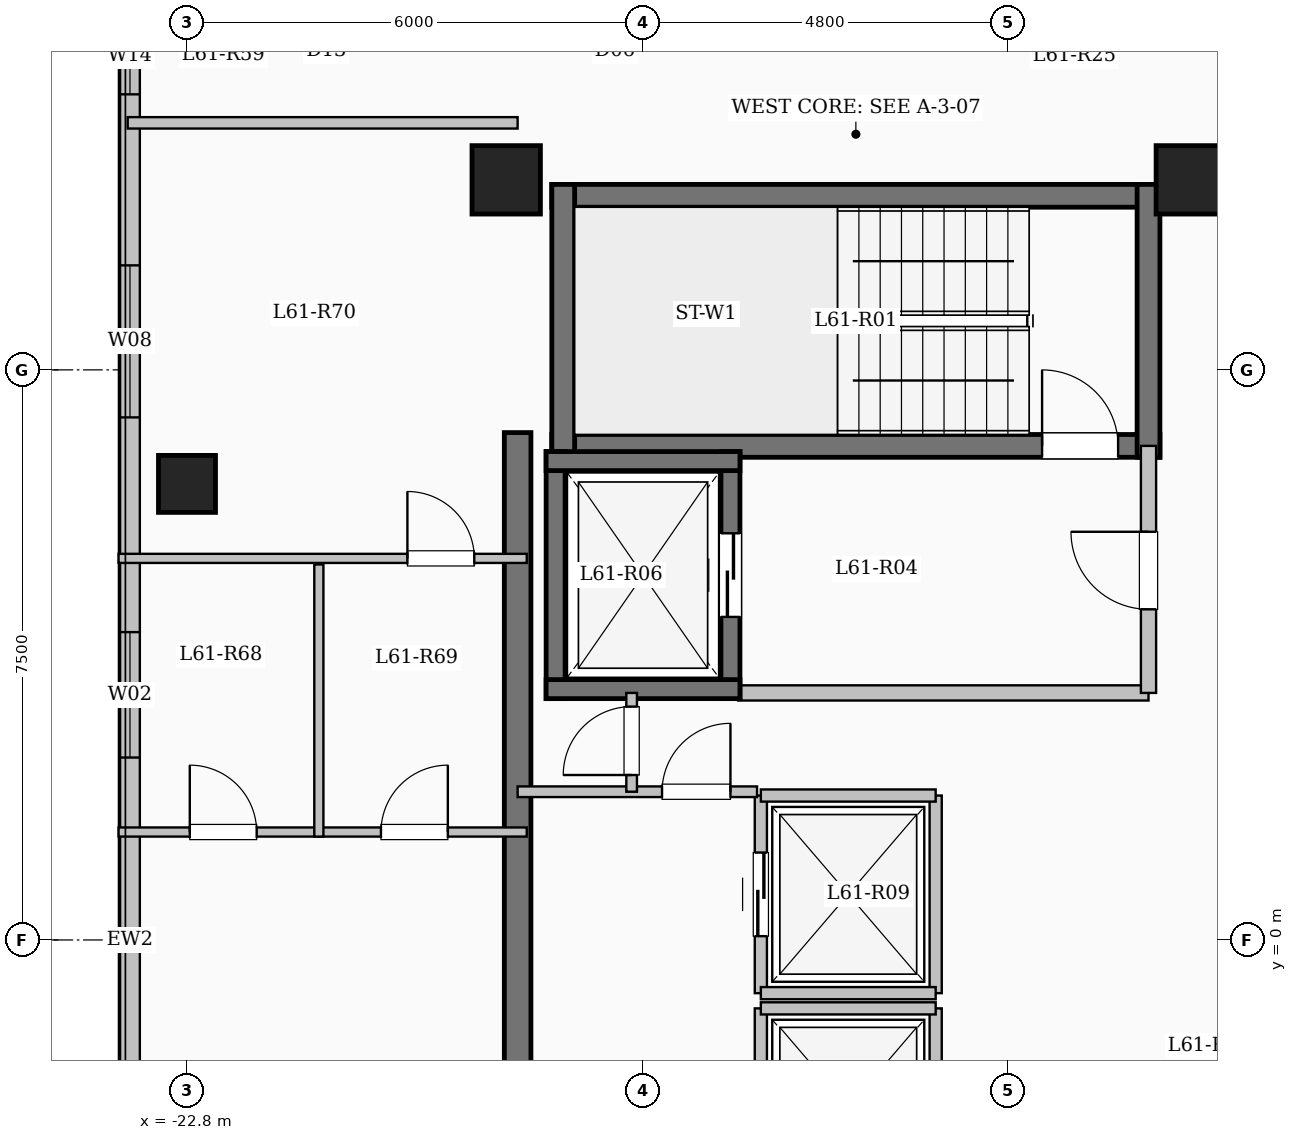
"""IFC4 building model, lengths in metres.
Left out: names, types, materials, properties, quantities, classifications, styles, units other than length and angle.
Written with IfcOpenShell. Run it as: python <this file> out.ifc"""

import sys

from ifc_helpers import new_model, si_unit, direction, frame, frame_2d, origin, origin_2d, place, context, subcontext, project, spatial, rectangle, extrude, element, fill, save


model = new_model("IFC4")
c1 = context("Model", 3, precision=1e-05, world=origin(), true_north=direction((0.0, 1.0)))
c2 = subcontext(c1, "Body", "Model", "MODEL_VIEW")
j1 = project(units=[si_unit("LENGTHUNIT", "METRE"), si_unit("PLANEANGLEUNIT", "RADIAN")], contexts=[c1])
p1 = place(None, origin())
s1 = spatial("IfcSite", under=j1, at=p1, CompositionType="ELEMENT")
p2 = place(p1, origin())
s2 = spatial("IfcBuilding", under=s1, at=p2, CompositionType="ELEMENT")
p3 = place(p2, frame((0.0, 0.0, 223.75)))
s3 = spatial("IfcBuildingStorey", under=s2, at=p3, CompositionType="ELEMENT", Elevation=223.75)
for number, where, z_axis, x_axis in (
    (1, (-9.6, 10.0, 0.0), (0.0, 0.0, 1.0), (1.0, 0.0, 0.0)),
    (2, (-18.6, 10.0, 0.0), (0.0, 0.0, 1.0), (1.0, 0.0, 0.0)),
):
    element("IfcColumn", number, at=place(p3, frame(where, z_axis=z_axis, x_axis=x_axis)), inside=s3, PredefinedType="COLUMN", context=c2, shape_type="SweptSolid", body=[
        extrude(rectangle(XDim=0.9, YDim=0.9, at=origin_2d()), origin(), (0.0, 0.0, 1.0), 3.35),
    ])
p4 = place(p3, frame((-22.8, 6.0, 0.0), z_axis=(0.0, 0.0, 1.0), x_axis=(1.0, 0.0, 0.0)))
e3 = element("IfcColumn", 3, at=p4, inside=s3, PredefinedType="COLUMN", context=c2, shape_type="SweptSolid", body=[
    extrude(rectangle(XDim=0.75, YDim=0.75, at=origin_2d()), origin(), (0.0, 0.0, 1.0), 3.35),
])
p5 = place(p3, frame((-23.55, -17.25, 0.0), z_axis=(0.0, 0.0, 1.0), x_axis=(0.0, 1.0, 0.0)))
e4 = element("IfcWall", 4, at=p5, inside=s3, PredefinedType="SOLIDWALL", context=c2, shape_type="SweptSolid", body=[
    extrude(rectangle(XDim=34.5, YDim=0.26, at=frame_2d((17.25, 0.0))), origin(), (0.0, 0.0, 1.0), 3.05),
])
p6 = place(p5, frame((2.825, 0.0, 0.9)))
e5 = element("IfcOpeningElement", 5, at=p6, cuts=e4, PredefinedType="OPENING", context=c2, shape_type="SweptSolid", body=[
    extrude(rectangle(XDim=2.2, YDim=1.75, at=frame_2d((1.1, 0.875))), frame((0.0, 0.14, 0.0), z_axis=(0.0, -1.0, 0.0), x_axis=(1.0, 0.0, 0.0)), (0.0, 0.0, 1.0), 0.28),
])
p7 = place(p5, frame((8.325, 0.0, 0.95)))
e6 = element("IfcOpeningElement", 6, at=p7, cuts=e4, PredefinedType="OPENING", context=c2, shape_type="SweptSolid", body=[
    extrude(rectangle(XDim=1.2, YDim=1.5, at=frame_2d((0.6, 0.75))), frame((0.0, 0.14, 0.0), z_axis=(0.0, -1.0, 0.0), x_axis=(1.0, 0.0, 0.0)), (0.0, 0.0, 1.0), 0.28),
])
p8 = place(p5, frame((13.25, 0.0, 0.9)))
e7 = element("IfcOpeningElement", 7, at=p8, cuts=e4, PredefinedType="OPENING", context=c2, shape_type="SweptSolid", body=[
    extrude(rectangle(XDim=2.2, YDim=1.75, at=frame_2d((1.1, 0.875))), frame((0.0, 0.14, 0.0), z_axis=(0.0, -1.0, 0.0), x_axis=(1.0, 0.0, 0.0)), (0.0, 0.0, 1.0), 0.28),
])
p9 = place(p5, frame((19.65, 0.0, 0.9)))
e8 = element("IfcOpeningElement", 8, at=p9, cuts=e4, PredefinedType="OPENING", context=c2, shape_type="SweptSolid", body=[
    extrude(rectangle(XDim=1.65, YDim=1.6, at=frame_2d((0.825, 0.8))), frame((0.0, 0.14, 0.0), z_axis=(0.0, -1.0, 0.0), x_axis=(1.0, 0.0, 0.0)), (0.0, 0.0, 1.0), 0.28),
])
p10 = place(p5, frame((24.125, 0.0, 0.9)))
e9 = element("IfcOpeningElement", 9, at=p10, cuts=e4, PredefinedType="OPENING", context=c2, shape_type="SweptSolid", body=[
    extrude(rectangle(XDim=2.0, YDim=1.7, at=frame_2d((1.0, 0.85))), frame((0.0, 0.14, 0.0), z_axis=(0.0, -1.0, 0.0), x_axis=(1.0, 0.0, 0.0)), (0.0, 0.0, 1.0), 0.28),
])
p11 = place(p5, frame((28.375, 0.0, 0.95)))
e10 = element("IfcOpeningElement", 10, at=p11, cuts=e4, PredefinedType="OPENING", context=c2, shape_type="SweptSolid", body=[
    extrude(rectangle(XDim=1.0, YDim=1.5, at=frame_2d((0.5, 0.75))), frame((0.0, 0.14, 0.0), z_axis=(0.0, -1.0, 0.0), x_axis=(1.0, 0.0, 0.0)), (0.0, 0.0, 1.0), 0.28),
])
p12 = place(p5, frame((31.125, 0.0, 0.9)))
e11 = element("IfcOpeningElement", 11, at=p12, cuts=e4, PredefinedType="OPENING", context=c2, shape_type="SweptSolid", body=[
    extrude(rectangle(XDim=2.0, YDim=1.7, at=frame_2d((1.0, 0.85))), frame((0.0, 0.14, 0.0), z_axis=(0.0, -1.0, 0.0), x_axis=(1.0, 0.0, 0.0)), (0.0, 0.0, 1.0), 0.28),
])
p13 = place(p3, frame((-18.0, 9.79, 0.0), z_axis=(0.0, 0.0, 1.0), x_axis=(1.0, 0.0, 0.0)))
e12 = element("IfcWall", 12, at=p13, inside=s3, PredefinedType="SHEAR", context=c2, shape_type="SweptSolid", body=[
    extrude(rectangle(XDim=8.0, YDim=0.3, at=frame_2d((4.0, 0.0))), origin(), (0.0, 0.0, 1.0), 3.35),
])
p14 = place(p3, frame((-18.0, 6.5, 0.0), z_axis=(0.0, 0.0, 1.0), x_axis=(1.0, 0.0, 0.0)))
e13 = element("IfcWall", 13, at=p14, inside=s3, PredefinedType="SHEAR", context=c2, shape_type="SweptSolid", body=[
    extrude(rectangle(XDim=8.0, YDim=0.3, at=frame_2d((4.0, 0.0))), origin(), (0.0, 0.0, 1.0), 3.35),
])
p15 = place(p14, frame((6.45, 0.0, 0.0)))
e14 = element("IfcOpeningElement", 14, at=p15, cuts=e13, PredefinedType="OPENING", context=c2, shape_type="SweptSolid", body=[
    extrude(rectangle(XDim=1.0, YDim=2.15, at=frame_2d((0.5, 1.075))), frame((0.0, 0.16, 0.0), z_axis=(0.0, -1.0, 0.0), x_axis=(1.0, 0.0, 0.0)), (0.0, 0.0, 1.0), 0.32),
])
for number, where, z_axis, x_axis in (
    (15, (-17.85, 6.35, 0.0), (0.0, 0.0, 1.0), (0.0, 1.0, 0.0)),
    (16, (-10.15, 6.35, 0.0), (0.0, 0.0, 1.0), (0.0, 1.0, 0.0)),
):
    element("IfcWall", number, at=place(p3, frame(where, z_axis=z_axis, x_axis=x_axis)), inside=s3, PredefinedType="SHEAR", context=c2, shape_type="SweptSolid", body=[
        extrude(rectangle(XDim=3.59, YDim=0.3, at=frame_2d((1.795, 0.0))), origin(), (0.0, 0.0, 1.0), 3.35),
    ])
p16 = place(p3, frame((-15.55, 3.25, 0.0), z_axis=(0.0, 0.0, 1.0), x_axis=(1.0, 0.0, 0.0)))
e17 = element("IfcWall", 17, at=p16, inside=s3, PredefinedType="SOLIDWALL", context=c2, shape_type="SweptSolid", body=[
    extrude(rectangle(XDim=5.4, YDim=0.2, at=frame_2d((2.7, 0.0))), origin(), (0.0, 0.0, 1.0), 3.05),
])
p17 = place(p3, frame((-10.15, 3.25, 0.0), z_axis=(0.0, 0.0, 1.0), x_axis=(0.0, 1.0, 0.0)))
e18 = element("IfcWall", 18, at=p17, inside=s3, PredefinedType="SOLIDWALL", context=c2, shape_type="SweptSolid", body=[
    extrude(rectangle(XDim=3.25, YDim=0.2, at=frame_2d((1.625, 0.0))), origin(), (0.0, 0.0, 1.0), 3.05),
])
p18 = place(p17, frame((1.1, 0.0, 0.0)))
e19 = element("IfcOpeningElement", 19, at=p18, cuts=e18, PredefinedType="OPENING", context=c2, shape_type="SweptSolid", body=[
    extrude(rectangle(XDim=1.02, YDim=2.15, at=frame_2d((0.51, 1.075))), frame((0.0, 0.11, 0.0), z_axis=(0.0, -1.0, 0.0), x_axis=(1.0, 0.0, 0.0)), (0.0, 0.0, 1.0), 0.22),
])
p19 = place(p3, frame((-17.95, 3.175, 0.0), z_axis=(0.0, 0.0, 1.0), x_axis=(0.0, 1.0, 0.0)))
e20 = element("IfcWall", 20, at=p19, inside=s3, PredefinedType="SHEAR", context=c2, shape_type="SweptSolid", body=[
    extrude(rectangle(XDim=3.25, YDim=0.25, at=frame_2d((1.625, 0.0))), origin(), (0.0, 0.0, 1.0), 3.35),
])
p20 = place(p3, frame((-15.65, 3.175, 0.0), z_axis=(0.0, 0.0, 1.0), x_axis=(0.0, 1.0, 0.0)))
e21 = element("IfcWall", 21, at=p20, inside=s3, PredefinedType="SHEAR", context=c2, shape_type="SweptSolid", body=[
    extrude(rectangle(XDim=3.25, YDim=0.25, at=frame_2d((1.625, 0.0))), origin(), (0.0, 0.0, 1.0), 3.35),
])
p21 = place(p20, frame((1.075, 0.0, 0.0)))
e22 = element("IfcOpeningElement", 22, at=p21, cuts=e21, PredefinedType="OPENING", context=c2, shape_type="SweptSolid", body=[
    extrude(rectangle(XDim=1.1, YDim=2.15, at=frame_2d((0.55, 1.075))), frame((0.0, 0.135, 0.0), z_axis=(0.0, -1.0, 0.0), x_axis=(1.0, 0.0, 0.0)), (0.0, 0.0, 1.0), 0.27),
])
for number, where, z_axis, x_axis in (
    (23, (-18.075, 3.3, 0.0), (0.0, 0.0, 1.0), (1.0, 0.0, 0.0)),
    (24, (-18.075, 6.3, 0.0), (0.0, 0.0, 1.0), (1.0, 0.0, 0.0)),
):
    element("IfcWall", number, at=place(p3, frame(where, z_axis=z_axis, x_axis=x_axis)), inside=s3, PredefinedType="SHEAR", context=c2, shape_type="SweptSolid", body=[
        extrude(rectangle(XDim=2.55, YDim=0.25, at=frame_2d((1.275, 0.0))), origin(), (0.0, 0.0, 1.0), 3.35),
    ])
p22 = place(p3, frame((-15.25, -3.5, 0.0), z_axis=(0.0, 0.0, 1.0), x_axis=(0.0, 1.0, 0.0)))
e25 = element("IfcWall", 25, at=p22, inside=s3, PredefinedType="SOLIDWALL", context=c2, shape_type="SweptSolid", body=[
    extrude(rectangle(XDim=2.6, YDim=0.16, at=frame_2d((1.3, 0.0))), origin(), (0.0, 0.0, 1.0), 3.05),
])
p23 = place(p22, frame((0.75, 0.0, 0.0)))
e26 = element("IfcOpeningElement", 26, at=p23, cuts=e25, PredefinedType="OPENING", context=c2, shape_type="SweptSolid", body=[
    extrude(rectangle(XDim=1.1, YDim=2.15, at=frame_2d((0.55, 1.075))), frame((0.0, 0.09, 0.0), z_axis=(0.0, -1.0, 0.0), x_axis=(1.0, 0.0, 0.0)), (0.0, 0.0, 1.0), 0.18),
])
p24 = place(p3, frame((-12.95, -3.5, 0.0), z_axis=(0.0, 0.0, 1.0), x_axis=(0.0, 1.0, 0.0)))
e27 = element("IfcWall", 27, at=p24, inside=s3, PredefinedType="SOLIDWALL", context=c2, shape_type="SweptSolid", body=[
    extrude(rectangle(XDim=2.6, YDim=0.16, at=frame_2d((1.3, 0.0))), origin(), (0.0, 0.0, 1.0), 3.05),
])
p25 = place(p3, frame((-15.25, -0.9, 0.0), z_axis=(0.0, 0.0, 1.0), x_axis=(1.0, 0.0, 0.0)))
e28 = element("IfcWall", 28, at=p25, inside=s3, PredefinedType="SOLIDWALL", context=c2, shape_type="SweptSolid", body=[
    extrude(rectangle(XDim=2.3, YDim=0.16, at=frame_2d((1.15, 0.0))), origin(), (0.0, 0.0, 1.0), 3.05),
])
p26 = place(p3, frame((-15.25, -0.7, 0.0), z_axis=(0.0, 0.0, 1.0), x_axis=(0.0, 1.0, 0.0)))
e29 = element("IfcWall", 29, at=p26, inside=s3, PredefinedType="SOLIDWALL", context=c2, shape_type="SweptSolid", body=[
    extrude(rectangle(XDim=2.6, YDim=0.16, at=frame_2d((1.3, 0.0))), origin(), (0.0, 0.0, 1.0), 3.05),
])
p27 = place(p26, frame((0.75, 0.0, 0.0)))
e30 = element("IfcOpeningElement", 30, at=p27, cuts=e29, PredefinedType="OPENING", context=c2, shape_type="SweptSolid", body=[
    extrude(rectangle(XDim=1.1, YDim=2.15, at=frame_2d((0.55, 1.075))), frame((0.0, 0.09, 0.0), z_axis=(0.0, -1.0, 0.0), x_axis=(1.0, 0.0, 0.0)), (0.0, 0.0, 1.0), 0.18),
])
p28 = place(p3, frame((-12.95, -0.7, 0.0), z_axis=(0.0, 0.0, 1.0), x_axis=(0.0, 1.0, 0.0)))
e31 = element("IfcWall", 31, at=p28, inside=s3, PredefinedType="SOLIDWALL", context=c2, shape_type="SweptSolid", body=[
    extrude(rectangle(XDim=2.6, YDim=0.16, at=frame_2d((1.3, 0.0))), origin(), (0.0, 0.0, 1.0), 3.05),
])
for number, where, z_axis, x_axis in (
    (32, (-15.25, -0.7, 0.0), (0.0, 0.0, 1.0), (1.0, 0.0, 0.0)),
    (33, (-15.25, 1.9, 0.0), (0.0, 0.0, 1.0), (1.0, 0.0, 0.0)),
):
    element("IfcWall", number, at=place(p3, frame(where, z_axis=z_axis, x_axis=x_axis)), inside=s3, PredefinedType="SOLIDWALL", context=c2, shape_type="SweptSolid", body=[
        extrude(rectangle(XDim=2.3, YDim=0.16, at=frame_2d((1.15, 0.0))), origin(), (0.0, 0.0, 1.0), 3.05),
    ])
p29 = place(p3, frame((-18.45, -7.375, 0.0), z_axis=(0.0, 0.0, 1.0), x_axis=(0.0, 1.0, 0.0)))
e34 = element("IfcWall", 34, at=p29, inside=s3, PredefinedType="SHEAR", context=c2, shape_type="SweptSolid", body=[
    extrude(rectangle(XDim=14.05, YDim=0.35, at=frame_2d((7.025, 0.0))), origin(), (0.0, 0.0, 1.0), 3.35),
])
p30 = place(p3, frame((-18.45, 1.95, 0.0), z_axis=(0.0, 0.0, 1.0), x_axis=(1.0, 0.0, 0.0)))
e35 = element("IfcWall", 35, at=p30, inside=s3, PredefinedType="PARTITIONING", context=c2, shape_type="SweptSolid", body=[
    extrude(rectangle(XDim=3.15, YDim=0.14, at=frame_2d((1.575, 0.0))), origin(), (0.0, 0.0, 1.0), 3.05),
])
p31 = place(p30, frame((1.9, 0.0, 0.0)))
e36 = element("IfcOpeningElement", 36, at=p31, cuts=e35, PredefinedType="OPENING", context=c2, shape_type="SweptSolid", body=[
    extrude(rectangle(XDim=0.9, YDim=2.08, at=frame_2d((0.45, 1.04))), frame((0.0, 0.08, 0.0), z_axis=(0.0, -1.0, 0.0), x_axis=(1.0, 0.0, 0.0)), (0.0, 0.0, 1.0), 0.16),
])
p32 = place(p3, frame((-16.95, 1.95, 0.0), z_axis=(0.0, 0.0, 1.0), x_axis=(0.0, 1.0, 0.0)))
e37 = element("IfcWall", 37, at=p32, inside=s3, PredefinedType="PARTITIONING", context=c2, shape_type="SweptSolid", body=[
    extrude(rectangle(XDim=1.3, YDim=0.14, at=frame_2d((0.65, 0.0))), origin(), (0.0, 0.0, 1.0), 3.05),
])
p33 = place(p32, frame((0.22, 0.0, 0.0)))
e38 = element("IfcOpeningElement", 38, at=p33, cuts=e37, PredefinedType="OPENING", context=c2, shape_type="SweptSolid", body=[
    extrude(rectangle(XDim=0.9, YDim=2.08, at=frame_2d((0.45, 1.04))), frame((0.0, 0.08, 0.0), z_axis=(0.0, -1.0, 0.0), x_axis=(1.0, 0.0, 0.0)), (0.0, 0.0, 1.0), 0.16),
])
p34 = place(p3, frame((-23.58, 10.75, 0.0), z_axis=(0.0, 0.0, 1.0), x_axis=(1.0, 0.0, 0.0)))
e39 = element("IfcWall", 39, at=p34, inside=s3, PredefinedType="PARTITIONING", context=c2, shape_type="SweptSolid", body=[
    extrude(rectangle(XDim=5.13, YDim=0.15, at=frame_2d((2.565, 0.0))), origin(), (0.0, 0.0, 1.0), 3.05),
])
p35 = place(p3, frame((-23.7, 1.42, 0.0), z_axis=(0.0, 0.0, 1.0), x_axis=(1.0, 0.0, 0.0)))
e40 = element("IfcWall", 40, at=p35, inside=s3, PredefinedType="PARTITIONING", context=c2, shape_type="SweptSolid", body=[
    extrude(rectangle(XDim=5.37, YDim=0.12, at=frame_2d((2.685, 0.0))), origin(), (0.0, 0.0, 1.0), 3.05),
])
p36 = place(p35, frame((0.937, 0.0, 0.0)))
e41 = element("IfcOpeningElement", 41, at=p36, cuts=e40, PredefinedType="OPENING", context=c2, shape_type="SweptSolid", body=[
    extrude(rectangle(XDim=0.88, YDim=2.1, at=frame_2d((0.44, 1.05))), frame((0.0, 0.07, 0.0), z_axis=(0.0, -1.0, 0.0), x_axis=(1.0, 0.0, 0.0)), (0.0, 0.0, 1.0), 0.14),
])
p37 = place(p35, frame((3.452, 0.0, 0.0)))
e42 = element("IfcOpeningElement", 42, at=p37, cuts=e40, PredefinedType="OPENING", context=c2, shape_type="SweptSolid", body=[
    extrude(rectangle(XDim=0.88, YDim=2.1, at=frame_2d((0.44, 1.05))), frame((0.0, 0.07, 0.0), z_axis=(0.0, -1.0, 0.0), x_axis=(1.0, 0.0, 0.0)), (0.0, 0.0, 1.0), 0.14),
])
p38 = place(p3, frame((-23.7, 5.02, 0.0), z_axis=(0.0, 0.0, 1.0), x_axis=(1.0, 0.0, 0.0)))
e43 = element("IfcWall", 43, at=p38, inside=s3, PredefinedType="PARTITIONING", context=c2, shape_type="SweptSolid", body=[
    extrude(rectangle(XDim=5.37, YDim=0.12, at=frame_2d((2.685, 0.0))), origin(), (0.0, 0.0, 1.0), 3.05),
])
p39 = place(p38, frame((3.8, 0.0, 0.0)))
e44 = element("IfcOpeningElement", 44, at=p39, cuts=e43, PredefinedType="OPENING", context=c2, shape_type="SweptSolid", body=[
    extrude(rectangle(XDim=0.88, YDim=2.1, at=frame_2d((0.44, 1.05))), frame((0.0, 0.07, 0.0), z_axis=(0.0, -1.0, 0.0), x_axis=(1.0, 0.0, 0.0)), (0.0, 0.0, 1.0), 0.14),
])
p40 = place(p3, frame((-21.065, 1.36, 0.0), z_axis=(0.0, 0.0, 1.0), x_axis=(0.0, 1.0, 0.0)))
e45 = element("IfcWall", 45, at=p40, inside=s3, PredefinedType="PARTITIONING", context=c2, shape_type="SweptSolid", body=[
    extrude(rectangle(XDim=3.58, YDim=0.12, at=frame_2d((1.79, 0.0))), origin(), (0.0, 0.0, 1.0), 3.05),
])
p41 = place(p9, origin())
e46 = element("IfcWindow", 46, at=p41, inside=s3, PartitioningType="SINGLE_PANEL", PredefinedType="WINDOW", context=c2, shape_type="SweptSolid", body=[
    extrude(rectangle(XDim=1.65, YDim=1.6, at=frame_2d((0.825, 0.8))), frame((0.0, 0.03, 0.0), z_axis=(0.0, -1.0, 0.0), x_axis=(1.0, 0.0, 0.0)), (0.0, 0.0, 1.0), 0.06),
])
fill(e8, e46)
p42 = place(p10, origin())
e47 = element("IfcWindow", 47, at=p42, inside=s3, PartitioningType="SINGLE_PANEL", PredefinedType="WINDOW", context=c2, shape_type="SweptSolid", body=[
    extrude(rectangle(XDim=2.0, YDim=1.7, at=frame_2d((1.0, 0.85))), frame((0.0, 0.03, 0.0), z_axis=(0.0, -1.0, 0.0), x_axis=(1.0, 0.0, 0.0)), (0.0, 0.0, 1.0), 0.06),
])
fill(e9, e47)
p43 = place(p11, origin())
e48 = element("IfcWindow", 48, at=p43, inside=s3, PartitioningType="SINGLE_PANEL", PredefinedType="WINDOW", context=c2, shape_type="SweptSolid", body=[
    extrude(rectangle(XDim=1.0, YDim=1.5, at=frame_2d((0.5, 0.75))), frame((0.0, 0.03, 0.0), z_axis=(0.0, -1.0, 0.0), x_axis=(1.0, 0.0, 0.0)), (0.0, 0.0, 1.0), 0.06),
])
fill(e10, e48)
p44 = place(p15, origin())
e49 = element("IfcDoor", 49, at=p44, inside=s3, OperationType="SINGLE_SWING_LEFT", PredefinedType="DOOR", context=c2, shape_type="SweptSolid", body=[
    extrude(rectangle(XDim=1.0, YDim=2.15, at=frame_2d((0.5, 1.075))), frame((0.0, 0.025, 0.0), z_axis=(0.0, -1.0, 0.0), x_axis=(1.0, 0.0, 0.0)), (0.0, 0.0, 1.0), 0.05),
])
fill(e14, e49)
p45 = place(p18, origin())
e50 = element("IfcDoor", 50, at=p45, inside=s3, OperationType="SINGLE_SWING_RIGHT", PredefinedType="DOOR", context=c2, shape_type="SweptSolid", body=[
    extrude(rectangle(XDim=1.02, YDim=2.15, at=frame_2d((0.51, 1.075))), frame((0.0, 0.025, 0.0), z_axis=(0.0, -1.0, 0.0), x_axis=(1.0, 0.0, 0.0)), (0.0, 0.0, 1.0), 0.05),
])
fill(e19, e50)
p46 = place(p21, origin())
e51 = element("IfcDoor", 51, at=p46, inside=s3, OperationType="SLIDING_TO_LEFT", PredefinedType="DOOR", context=c2, shape_type="SweptSolid", body=[
    extrude(rectangle(XDim=1.1, YDim=2.15, at=frame_2d((0.55, 1.075))), frame((0.0, 0.025, 0.0), z_axis=(0.0, -1.0, 0.0), x_axis=(1.0, 0.0, 0.0)), (0.0, 0.0, 1.0), 0.05),
])
fill(e22, e51)
p47 = place(p27, origin())
e52 = element("IfcDoor", 52, at=p47, inside=s3, OperationType="SLIDING_TO_LEFT", PredefinedType="DOOR", context=c2, shape_type="SweptSolid", body=[
    extrude(rectangle(XDim=1.1, YDim=2.15, at=frame_2d((0.55, 1.075))), frame((0.0, 0.025, 0.0), z_axis=(0.0, -1.0, 0.0), x_axis=(1.0, 0.0, 0.0)), (0.0, 0.0, 1.0), 0.05),
])
fill(e30, e52)
p48 = place(p31, origin())
e53 = element("IfcDoor", 53, at=p48, inside=s3, OperationType="SINGLE_SWING_RIGHT", PredefinedType="DOOR", context=c2, shape_type="SweptSolid", body=[
    extrude(rectangle(XDim=0.9, YDim=2.08, at=frame_2d((0.45, 1.04))), frame((0.0, 0.025, 0.0), z_axis=(0.0, -1.0, 0.0), x_axis=(1.0, 0.0, 0.0)), (0.0, 0.0, 1.0), 0.05),
])
fill(e36, e53)
p49 = place(p33, origin())
e54 = element("IfcDoor", 54, at=p49, inside=s3, OperationType="SINGLE_SWING_LEFT", PredefinedType="DOOR", context=c2, shape_type="SweptSolid", body=[
    extrude(rectangle(XDim=0.9, YDim=2.08, at=frame_2d((0.45, 1.04))), frame((0.0, 0.025, 0.0), z_axis=(0.0, -1.0, 0.0), x_axis=(1.0, 0.0, 0.0)), (0.0, 0.0, 1.0), 0.05),
])
fill(e38, e54)
p50 = place(p36, origin())
e55 = element("IfcDoor", 55, at=p50, inside=s3, OperationType="SINGLE_SWING_LEFT", PredefinedType="DOOR", context=c2, shape_type="SweptSolid", body=[
    extrude(rectangle(XDim=0.88, YDim=2.1, at=frame_2d((0.44, 1.05))), frame((0.0, 0.025, 0.0), z_axis=(0.0, -1.0, 0.0), x_axis=(1.0, 0.0, 0.0)), (0.0, 0.0, 1.0), 0.05),
])
fill(e41, e55)
p51 = place(p37, origin())
e56 = element("IfcDoor", 56, at=p51, inside=s3, OperationType="SINGLE_SWING_RIGHT", PredefinedType="DOOR", context=c2, shape_type="SweptSolid", body=[
    extrude(rectangle(XDim=0.88, YDim=2.1, at=frame_2d((0.44, 1.05))), frame((0.0, 0.025, 0.0), z_axis=(0.0, -1.0, 0.0), x_axis=(1.0, 0.0, 0.0)), (0.0, 0.0, 1.0), 0.05),
])
fill(e42, e56)
p52 = place(p39, origin())
e57 = element("IfcDoor", 57, at=p52, inside=s3, OperationType="SINGLE_SWING_LEFT", PredefinedType="DOOR", context=c2, shape_type="SweptSolid", body=[
    extrude(rectangle(XDim=0.88, YDim=2.1, at=frame_2d((0.44, 1.05))), frame((0.0, 0.025, 0.0), z_axis=(0.0, -1.0, 0.0), x_axis=(1.0, 0.0, 0.0)), (0.0, 0.0, 1.0), 0.05),
])
fill(e44, e57)
save(model, sys.argv[1])
